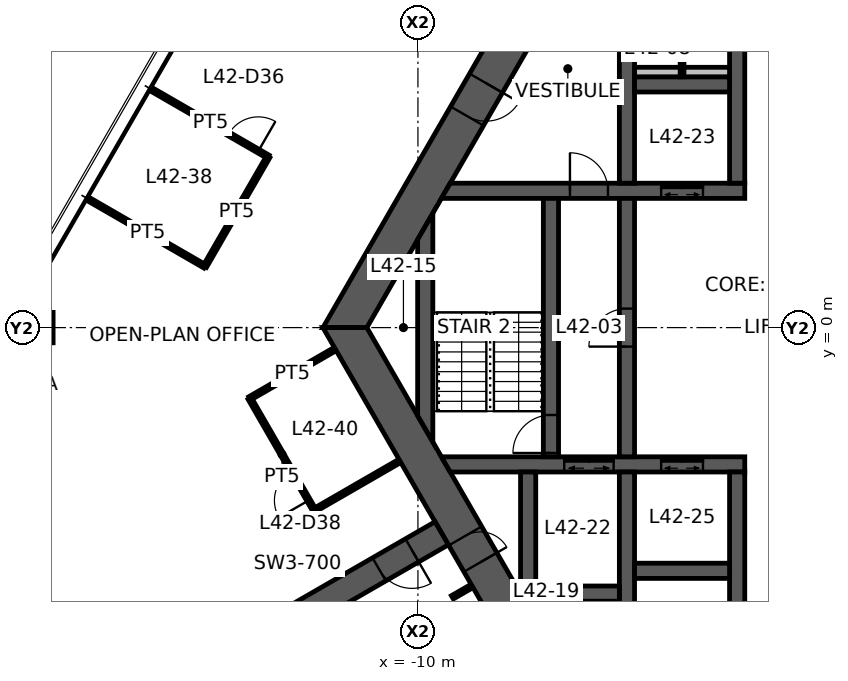
"""IFC4 building model, lengths in metres.
Left out: names, types, materials, properties, quantities, classifications, styles, units other than length and angle.
Written with IfcOpenShell. Run it as: python <this file> out.ifc"""

import sys

from ifc_helpers import new_model, si_unit, direction, frame, frame_2d, origin, origin_2d, place, context, subcontext, project, spatial, polyline, rectangle, hollow_rectangle, outline, extrude, element, fill, save


model = new_model("IFC4")
c1 = context("Model", 3, precision=1e-05, world=origin(), true_north=direction((0.0, 1.0)))
c2 = subcontext(c1, "Body", "Model", "MODEL_VIEW")
j1 = project(units=[si_unit("LENGTHUNIT", "METRE"), si_unit("PLANEANGLEUNIT", "RADIAN")], contexts=[c1])
p1 = place(None, origin())
s1 = spatial("IfcSite", under=j1, at=p1, CompositionType="ELEMENT")
p2 = place(p1, origin())
s2 = spatial("IfcBuilding", under=s1, at=p2, CompositionType="ELEMENT")
p3 = place(p2, frame((0.0, 0.0, 168.2)))
s3 = spatial("IfcBuildingStorey", under=s2, at=p3, CompositionType="ELEMENT", Elevation=168.2)
p4 = place(p3, frame((-20.0, 0.0, 0.0), z_axis=(0.0, 0.0, 1.0), x_axis=(1.0, 0.0, 0.0)))
e1 = element("IfcColumn", 1, at=p4, inside=s3, PredefinedType="COLUMN", context=c2, shape_type="SweptSolid", body=[
    extrude(hollow_rectangle(XDim=0.8, YDim=0.8, WallThickness=0.045, at=origin_2d()), origin(), (0.0, 0.0, 1.0), 3.9),
])
p5 = place(p3, frame((-5.961, 10.325, 0.0), z_axis=(0.0, 0.0, 1.0), x_axis=(-0.500004296715, -0.866022923061, 0.0)))
e2 = element("IfcWall", 2, at=p5, inside=s3, PredefinedType="SHEAR", context=c2, shape_type="SweptSolid", body=[
    extrude(outline(polyline([(-0.289, -0.5), (4.494, -0.5), (5.494, -0.5), (12.211, -0.5), (11.634, 0.5), (5.494, 0.5), (4.494, 0.5), (0.289, 0.5), (-0.289, -0.5)])), origin(), (0.0, 0.0, 1.0), 3.9),
])
p6 = place(p5, frame((4.494, 0.0, 0.0)))
e3 = element("IfcOpeningElement", 3, at=p6, cuts=e2, PredefinedType="OPENING", context=c2, shape_type="SweptSolid", body=[
    extrude(rectangle(XDim=1.0, YDim=2.1, at=frame_2d((0.5, 1.05))), frame((0.0, 0.51, 0.0), z_axis=(0.0, -1.0, 0.0), x_axis=(1.0, 0.0, 0.0)), (0.0, 0.0, 1.0), 1.02),
])
p7 = place(p3, frame((-11.922, 0.0, 0.0), z_axis=(0.0, 0.0, 1.0), x_axis=(0.500004296715, -0.866022923061, 0.0)))
e4 = element("IfcWall", 4, at=p7, inside=s3, PredefinedType="SHEAR", context=c2, shape_type="SweptSolid", body=[
    extrude(outline(polyline([(-0.289, -0.5), (6.331, -0.5), (7.131, -0.5), (12.211, -0.5), (11.634, 0.5), (7.131, 0.5), (6.331, 0.5), (0.289, 0.5), (-0.289, -0.5)])), origin(), (0.0, 0.0, 1.0), 3.9),
])
p8 = place(p7, frame((6.331, 0.0, 0.0)))
e5 = element("IfcOpeningElement", 5, at=p8, cuts=e4, PredefinedType="OPENING", context=c2, shape_type="SweptSolid", body=[
    extrude(rectangle(XDim=0.8, YDim=2.1, at=frame_2d((0.4, 1.05))), frame((0.0, 0.51, 0.0), z_axis=(0.0, -1.0, 0.0), x_axis=(1.0, 0.0, 0.0)), (0.0, 0.0, 1.0), 1.02),
])
p9 = place(p3, frame((-9.375, -5.413, 0.0), z_axis=(0.0, 0.0, 1.0), x_axis=(-0.866032377459, -0.499987921047, 0.0)))
e6 = element("IfcWall", 6, at=p9, inside=s3, PredefinedType="SHEAR", context=c2, shape_type="SweptSolid", body=[
    extrude(rectangle(XDim=7.696, YDim=0.7, at=frame_2d((3.848, 0.0))), origin(), (0.0, 0.0, 1.0), 3.9),
])
p10 = place(p9, frame((0.9, 0.0, 0.0)))
e7 = element("IfcOpeningElement", 7, at=p10, cuts=e6, PredefinedType="OPENING", context=c2, shape_type="SweptSolid", body=[
    extrude(rectangle(XDim=1.0, YDim=2.1, at=frame_2d((0.5, 1.05))), frame((0.0, 0.36, 0.0), z_axis=(0.0, -1.0, 0.0), x_axis=(1.0, 0.0, 0.0)), (0.0, 0.0, 1.0), 0.72),
])
p11 = place(p3, frame((-9.266, 3.6, 0.0), z_axis=(0.0, 0.0, 1.0), x_axis=(1.0, 0.0, 0.0)))
e8 = element("IfcWall", 8, at=p11, inside=s3, PredefinedType="SHEAR", context=c2, shape_type="SweptSolid", body=[
    extrude(outline(polyline([(-0.115, -0.2), (3.266, -0.2), (4.266, -0.2), (5.667, -0.2), (6.767, -0.2), (7.866, -0.2), (7.866, 0.2), (6.767, 0.2), (5.667, 0.2), (4.266, 0.2), (3.266, 0.2), (0.115, 0.2), (-0.115, -0.2)])), origin(), (0.0, 0.0, 1.0), 3.9),
])
p12 = place(p11, frame((3.266, 0.0, 0.0)))
e9 = element("IfcOpeningElement", 9, at=p12, cuts=e8, PredefinedType="OPENING", context=c2, shape_type="SweptSolid", body=[
    extrude(rectangle(XDim=1.0, YDim=2.1, at=frame_2d((0.5, 1.05))), frame((0.0, 0.21, 0.0), z_axis=(0.0, -1.0, 0.0), x_axis=(1.0, 0.0, 0.0)), (0.0, 0.0, 1.0), 0.42),
])
p13 = place(p11, frame((5.667, 0.0, 0.0)))
e10 = element("IfcOpeningElement", 10, at=p13, cuts=e8, PredefinedType="OPENING", context=c2, shape_type="SweptSolid", body=[
    extrude(rectangle(XDim=1.1, YDim=2.1, at=frame_2d((0.55, 1.05))), frame((0.0, 0.21, 0.0), z_axis=(0.0, -1.0, 0.0), x_axis=(1.0, 0.0, 0.0)), (0.0, 0.0, 1.0), 0.42),
])
p14 = place(p3, frame((-9.266, -3.6, 0.0), z_axis=(0.0, 0.0, 1.0), x_axis=(1.0, 0.0, 0.0)))
e11 = element("IfcWall", 11, at=p14, inside=s3, PredefinedType="SHEAR", context=c2, shape_type="SweptSolid", body=[
    extrude(outline(polyline([(0.115, -0.2), (3.116, -0.2), (4.417, -0.2), (5.667, -0.2), (6.767, -0.2), (7.866, -0.2), (7.866, 0.2), (6.767, 0.2), (5.667, 0.2), (4.417, 0.2), (3.116, 0.2), (-0.115, 0.2), (0.115, -0.2)])), origin(), (0.0, 0.0, 1.0), 3.9),
])
p15 = place(p14, frame((5.667, 0.0, 0.0)))
e12 = element("IfcOpeningElement", 12, at=p15, cuts=e11, PredefinedType="OPENING", context=c2, shape_type="SweptSolid", body=[
    extrude(rectangle(XDim=1.1, YDim=2.1, at=frame_2d((0.55, 1.05))), frame((0.0, 0.21, 0.0), z_axis=(0.0, -1.0, 0.0), x_axis=(1.0, 0.0, 0.0)), (0.0, 0.0, 1.0), 0.42),
])
p16 = place(p14, frame((3.116, 0.0, 0.0)))
e13 = element("IfcOpeningElement", 13, at=p16, cuts=e11, PredefinedType="OPENING", context=c2, shape_type="SweptSolid", body=[
    extrude(rectangle(XDim=1.3, YDim=2.1, at=frame_2d((0.65, 1.05))), frame((0.0, 0.21, 0.0), z_axis=(0.0, -1.0, 0.0), x_axis=(1.0, 0.0, 0.0)), (0.0, 0.0, 1.0), 0.42),
])
p17 = place(p3, frame((-1.6, 3.8, 0.0), z_axis=(0.0, 0.0, 1.0), x_axis=(0.0, 1.0, 0.0)))
e14 = element("IfcWall", 14, at=p17, inside=s3, PredefinedType="SHEAR", context=c2, shape_type="SweptSolid", body=[
    extrude(rectangle(XDim=6.025, YDim=0.4, at=frame_2d((3.012, 0.0))), origin(), (0.0, 0.0, 1.0), 3.9),
])
p18 = place(p17, frame((3.75, 0.0, 0.0)))
e15 = element("IfcOpeningElement", 15, at=p18, cuts=e14, PredefinedType="OPENING", context=c2, shape_type="SweptSolid", body=[
    extrude(rectangle(XDim=0.9, YDim=2.1, at=frame_2d((0.45, 1.05))), frame((0.0, 0.21, 0.0), z_axis=(0.0, -1.0, 0.0), x_axis=(1.0, 0.0, 0.0)), (0.0, 0.0, 1.0), 0.42),
])
p19 = place(p3, frame((-1.6, -3.8, 0.0), z_axis=(0.0, 0.0, 1.0), x_axis=(0.0, -1.0, 0.0)))
e16 = element("IfcWall", 16, at=p19, inside=s3, PredefinedType="SHEAR", context=c2, shape_type="SweptSolid", body=[
    extrude(rectangle(XDim=6.025, YDim=0.4, at=frame_2d((3.012, 0.0))), origin(), (0.0, 0.0, 1.0), 3.9),
])
p20 = place(p19, frame((3.75, 0.0, 0.0)))
e17 = element("IfcOpeningElement", 17, at=p20, cuts=e16, PredefinedType="OPENING", context=c2, shape_type="SweptSolid", body=[
    extrude(rectangle(XDim=0.9, YDim=2.1, at=frame_2d((0.45, 1.05))), frame((0.0, 0.21, 0.0), z_axis=(0.0, -1.0, 0.0), x_axis=(1.0, 0.0, 0.0)), (0.0, 0.0, 1.0), 0.42),
])
p21 = place(p3, frame((-4.5, -3.4, 0.0), z_axis=(0.0, 0.0, 1.0), x_axis=(0.0, 1.0, 0.0)))
e18 = element("IfcWall", 18, at=p21, inside=s3, PredefinedType="SHEAR", context=c2, shape_type="SweptSolid", body=[
    extrude(rectangle(XDim=6.8, YDim=0.4, at=frame_2d((3.4, 0.0))), origin(), (0.0, 0.0, 1.0), 3.9),
])
p22 = place(p21, frame((2.9, 0.0, 0.0)))
e19 = element("IfcOpeningElement", 19, at=p22, cuts=e18, PredefinedType="OPENING", context=c2, shape_type="SweptSolid", body=[
    extrude(rectangle(XDim=1.0, YDim=2.1, at=frame_2d((0.5, 1.05))), frame((0.0, 0.21, 0.0), z_axis=(0.0, -1.0, 0.0), x_axis=(1.0, 0.0, 0.0)), (0.0, 0.0, 1.0), 0.42),
])
p23 = place(p3, frame((-6.5, -3.4, 0.0), z_axis=(0.0, 0.0, 1.0), x_axis=(0.0, 1.0, 0.0)))
e20 = element("IfcWall", 20, at=p23, inside=s3, PredefinedType="SHEAR", context=c2, shape_type="SweptSolid", body=[
    extrude(rectangle(XDim=6.8, YDim=0.4, at=frame_2d((3.4, 0.0))), origin(), (0.0, 0.0, 1.0), 3.9),
])
p24 = place(p23, frame((0.1, 0.0, 0.0)))
e21 = element("IfcOpeningElement", 21, at=p24, cuts=e20, PredefinedType="OPENING", context=c2, shape_type="SweptSolid", body=[
    extrude(rectangle(XDim=1.0, YDim=2.1, at=frame_2d((0.5, 1.05))), frame((0.0, 0.21, 0.0), z_axis=(0.0, -1.0, 0.0), x_axis=(1.0, 0.0, 0.0)), (0.0, 0.0, 1.0), 0.42),
])
for number, where, z_axis, x_axis in (
    (22, (-4.5, 3.8, 0.0), (0.0, 0.0, 1.0), (0.0, 1.0, 0.0)),
    (23, (-4.5, -3.8, 0.0), (0.0, 0.0, 1.0), (0.0, -1.0, 0.0)),
):
    element("IfcWall", number, at=place(p3, frame(where, z_axis=z_axis, x_axis=x_axis)), inside=s3, PredefinedType="SHEAR", context=c2, shape_type="SweptSolid", body=[
        extrude(rectangle(XDim=6.025, YDim=0.4, at=frame_2d((3.012, 0.0))), origin(), (0.0, 0.0, 1.0), 3.9),
    ])
for number, where, z_axis, x_axis in (
    (24, (-4.3, 6.4, 0.0), (0.0, 0.0, 1.0), (1.0, 0.0, 0.0)),
    (25, (-4.3, -6.4, 0.0), (0.0, 0.0, 1.0), (1.0, 0.0, 0.0)),
):
    element("IfcWall", number, at=place(p3, frame(where, z_axis=z_axis, x_axis=x_axis)), inside=s3, PredefinedType="SHEAR", context=c2, shape_type="SweptSolid", body=[
        extrude(rectangle(XDim=2.5, YDim=0.4, at=frame_2d((1.25, 0.0))), origin(), (0.0, 0.0, 1.0), 3.9),
    ])
p25 = place(p3, frame((-6.9, -7.0, 0.0), z_axis=(0.0, 0.0, 1.0), x_axis=(1.0, 0.0, 0.0)))
e26 = element("IfcWall", 26, at=p25, inside=s3, PredefinedType="SHEAR", context=c2, shape_type="SweptSolid", body=[
    extrude(rectangle(XDim=2.2, YDim=0.4, at=frame_2d((1.1, 0.0))), origin(), (0.0, 0.0, 1.0), 3.9),
])
p26 = place(p3, frame((-7.1, -3.8, 0.0), z_axis=(0.0, 0.0, 1.0), x_axis=(0.0, -1.0, 0.0)))
e27 = element("IfcWall", 27, at=p26, inside=s3, PredefinedType="SHEAR", context=c2, shape_type="SweptSolid", body=[
    extrude(outline(polyline([(0.0, -0.2), (3.206, -0.2), (3.4, 0.0), (3.4, 0.2), (0.0, 0.2), (0.0, -0.2)])), origin(), (0.0, 0.0, 1.0), 3.9),
])
p27 = place(p3, frame((-9.808, -2.662, 0.0), z_axis=(0.0, 0.0, 1.0), x_axis=(0.0, 1.0, 0.0)))
e28 = element("IfcWall", 28, at=p27, inside=s3, PredefinedType="SHEAR", context=c2, shape_type="SweptSolid", body=[
    extrude(outline(polyline([(-0.346, -0.2), (5.671, -0.2), (4.978, 0.2), (0.346, 0.2), (-0.346, -0.2)])), origin(), (0.0, 0.0, 1.0), 3.9),
])
p28 = place(p3, frame((-4.3, 6.725, 0.0), z_axis=(0.0, 0.0, 1.0), x_axis=(1.0, 0.0, 0.0)))
e29 = element("IfcWall", 29, at=p28, inside=s3, PredefinedType="PLUMBINGWALL", context=c2, shape_type="SweptSolid", body=[
    extrude(rectangle(XDim=2.5, YDim=0.25, at=frame_2d((1.25, 0.0))), origin(), (0.0, 0.0, 1.0), 3.9),
])
p29 = place(p3, frame((-3.05, 6.6, 0.0), z_axis=(0.0, 0.0, 1.0), x_axis=(0.0, 1.0, 0.0)))
e30 = element("IfcWall", 30, at=p29, inside=s3, PredefinedType="PARTITIONING", context=c2, shape_type="SweptSolid", body=[
    extrude(rectangle(XDim=3.225, YDim=0.1, at=frame_2d((1.612, 0.0))), origin(), (0.0, 0.0, 1.0), 2.95),
])
p30 = place(p29, frame((1.95, 0.0, 0.0)))
e31 = element("IfcOpeningElement", 31, at=p30, cuts=e30, PredefinedType="OPENING", context=c2, shape_type="SweptSolid", body=[
    extrude(rectangle(XDim=0.9, YDim=2.1, at=frame_2d((0.45, 1.05))), frame((0.0, 0.06, 0.0), z_axis=(0.0, -1.0, 0.0), x_axis=(1.0, 0.0, 0.0)), (0.0, 0.0, 1.0), 0.12),
])
p31 = place(p29, frame((0.413, 0.0, 0.0)))
e32 = element("IfcOpeningElement", 32, at=p31, cuts=e30, PredefinedType="OPENING", context=c2, shape_type="SweptSolid", body=[
    extrude(rectangle(XDim=0.9, YDim=2.1, at=frame_2d((0.45, 1.05))), frame((0.0, 0.06, 0.0), z_axis=(0.0, -1.0, 0.0), x_axis=(1.0, 0.0, 0.0)), (0.0, 0.0, 1.0), 0.12),
])
p32 = place(p3, frame((-16.976, 6.248, 0.0), z_axis=(0.0, 0.0, 1.0), x_axis=(0.866001150353, -0.500042005822, 0.0)))
e33 = element("IfcWall", 33, at=p32, inside=s3, PredefinedType="PARTITIONING", context=c2, shape_type="SweptSolid", body=[
    extrude(rectangle(XDim=3.505, YDim=0.1, at=frame_2d((1.752, 0.0))), origin(), (0.0, 0.0, 1.0), 2.95),
])
p33 = place(p32, frame((2.305, 0.0, 0.0)))
e34 = element("IfcOpeningElement", 34, at=p33, cuts=e33, PredefinedType="OPENING", context=c2, shape_type="SweptSolid", body=[
    extrude(rectangle(XDim=0.9, YDim=2.1, at=frame_2d((0.45, 1.05))), frame((0.0, 0.06, 0.0), z_axis=(0.0, -1.0, 0.0), x_axis=(1.0, 0.0, 0.0)), (0.0, 0.0, 1.0), 0.12),
])
p34 = place(p3, frame((-15.606, 1.611, 0.0), z_axis=(0.0, 0.0, 1.0), x_axis=(-0.86601968407, 0.500009906705, 0.0)))
e35 = element("IfcWall", 35, at=p34, inside=s3, PredefinedType="PARTITIONING", context=c2, shape_type="SweptSolid", body=[
    extrude(rectangle(XDim=3.48, YDim=0.1, at=frame_2d((1.74, 0.0))), origin(), (0.0, 0.0, 1.0), 2.95),
])
p35 = place(p3, frame((-13.941, 4.495, 0.0), z_axis=(0.0, 0.0, 1.0), x_axis=(-0.500033344505, -0.86600615147, 0.0)))
e36 = element("IfcWall", 36, at=p35, inside=s3, PredefinedType="PARTITIONING", context=c2, shape_type="SweptSolid", body=[
    extrude(rectangle(XDim=3.331, YDim=0.1, at=frame_2d((1.666, 0.0))), origin(), (0.0, 0.0, 1.0), 2.95),
])
p36 = place(p3, frame((-14.427, -1.863, 0.0), z_axis=(0.0, 0.0, 1.0), x_axis=(0.866045356598, 0.49996543912, 0.0)))
e37 = element("IfcWall", 37, at=p36, inside=s3, PredefinedType="PARTITIONING", context=c2, shape_type="SweptSolid", body=[
    extrude(rectangle(XDim=2.58, YDim=0.1, at=frame_2d((1.29, 0.0))), origin(), (0.0, 0.0, 1.0), 2.95),
])
p37 = place(p3, frame((-12.726, -4.807, 0.0), z_axis=(0.0, 0.0, 1.0), x_axis=(-0.500062241894, 0.865989465428, 0.0)))
e38 = element("IfcWall", 38, at=p37, inside=s3, PredefinedType="PARTITIONING", context=c2, shape_type="SweptSolid", body=[
    extrude(rectangle(XDim=3.4, YDim=0.1, at=frame_2d((1.7, 0.0))), origin(), (0.0, 0.0, 1.0), 2.95),
])
p38 = place(p37, frame((0.3, 0.0, 0.0)))
e39 = element("IfcOpeningElement", 39, at=p38, cuts=e38, PredefinedType="OPENING", context=c2, shape_type="SweptSolid", body=[
    extrude(rectangle(XDim=0.9, YDim=2.1, at=frame_2d((0.45, 1.05))), frame((0.0, 0.06, 0.0), z_axis=(0.0, -1.0, 0.0), x_axis=(1.0, 0.0, 0.0)), (0.0, 0.0, 1.0), 0.12),
])
p39 = place(p3, frame((-10.492, -3.517, 0.0), z_axis=(0.0, 0.0, 1.0), x_axis=(-0.866021702275, -0.500006411147, 0.0)))
e40 = element("IfcWall", 40, at=p39, inside=s3, PredefinedType="PARTITIONING", context=c2, shape_type="SweptSolid", body=[
    extrude(rectangle(XDim=2.58, YDim=0.1, at=frame_2d((1.29, 0.0))), origin(), (0.0, 0.0, 1.0), 2.95),
])
p40 = place(p3, frame((-9.094, -7.098, 0.0), z_axis=(0.0, 0.0, 1.0), x_axis=(0.865954211699, 0.50012328804, 0.0)))
e41 = element("IfcWall", 41, at=p40, inside=s3, PredefinedType="PARTITIONING", context=c2, shape_type="SweptSolid", body=[
    extrude(rectangle(XDim=0.58, YDim=0.1, at=frame_2d((0.29, 0.0))), origin(), (0.0, 0.0, 1.0), 2.95),
])
p41 = place(p8, origin())
e42 = element("IfcDoor", 42, at=p41, inside=s3, OperationType="SINGLE_SWING_RIGHT", PredefinedType="DOOR", context=c2, shape_type="SweptSolid", body=[
    extrude(rectangle(XDim=0.8, YDim=2.1, at=frame_2d((0.4, 1.05))), frame((0.0, 0.025, 0.0), z_axis=(0.0, -1.0, 0.0), x_axis=(1.0, 0.0, 0.0)), (0.0, 0.0, 1.0), 0.05),
])
fill(e5, e42)
p42 = place(p6, origin())
e43 = element("IfcDoor", 43, at=p42, inside=s3, OperationType="SINGLE_SWING_LEFT", PredefinedType="DOOR", context=c2, shape_type="SweptSolid", body=[
    extrude(rectangle(XDim=1.0, YDim=2.1, at=frame_2d((0.5, 1.05))), frame((0.0, 0.025, 0.0), z_axis=(0.0, -1.0, 0.0), x_axis=(1.0, 0.0, 0.0)), (0.0, 0.0, 1.0), 0.05),
])
fill(e3, e43)
p43 = place(p22, origin())
e44 = element("IfcDoor", 44, at=p43, inside=s3, OperationType="SINGLE_SWING_LEFT", PredefinedType="DOOR", context=c2, shape_type="SweptSolid", body=[
    extrude(rectangle(XDim=1.0, YDim=2.1, at=frame_2d((0.5, 1.05))), frame((0.0, 0.025, 0.0), z_axis=(0.0, -1.0, 0.0), x_axis=(1.0, 0.0, 0.0)), (0.0, 0.0, 1.0), 0.05),
])
fill(e19, e44)
p44 = place(p24, origin())
e45 = element("IfcDoor", 45, at=p44, inside=s3, OperationType="SINGLE_SWING_LEFT", PredefinedType="DOOR", context=c2, shape_type="SweptSolid", body=[
    extrude(rectangle(XDim=1.0, YDim=2.1, at=frame_2d((0.5, 1.05))), frame((0.0, 0.025, 0.0), z_axis=(0.0, -1.0, 0.0), x_axis=(1.0, 0.0, 0.0)), (0.0, 0.0, 1.0), 0.05),
])
fill(e21, e45)
p45 = place(p12, origin())
e46 = element("IfcDoor", 46, at=p45, inside=s3, OperationType="SINGLE_SWING_LEFT", PredefinedType="DOOR", context=c2, shape_type="SweptSolid", body=[
    extrude(rectangle(XDim=1.0, YDim=2.1, at=frame_2d((0.5, 1.05))), frame((0.0, 0.025, 0.0), z_axis=(0.0, -1.0, 0.0), x_axis=(1.0, 0.0, 0.0)), (0.0, 0.0, 1.0), 0.05),
])
fill(e9, e46)
p46 = place(p10, origin())
e47 = element("IfcDoor", 47, at=p46, inside=s3, OperationType="SINGLE_SWING_LEFT", PredefinedType="DOOR", context=c2, shape_type="SweptSolid", body=[
    extrude(rectangle(XDim=1.0, YDim=2.1, at=frame_2d((0.5, 1.05))), frame((0.0, 0.025, 0.0), z_axis=(0.0, -1.0, 0.0), x_axis=(1.0, 0.0, 0.0)), (0.0, 0.0, 1.0), 0.05),
])
fill(e7, e47)
p47 = place(p31, origin())
e48 = element("IfcDoor", 48, at=p47, inside=s3, OperationType="SINGLE_SWING_RIGHT", PredefinedType="DOOR", context=c2, shape_type="SweptSolid", body=[
    extrude(rectangle(XDim=0.9, YDim=2.1, at=frame_2d((0.45, 1.05))), frame((0.0, 0.025, 0.0), z_axis=(0.0, -1.0, 0.0), x_axis=(1.0, 0.0, 0.0)), (0.0, 0.0, 1.0), 0.05),
])
fill(e32, e48)
p48 = place(p33, origin())
e49 = element("IfcDoor", 49, at=p48, inside=s3, OperationType="SINGLE_SWING_RIGHT", PredefinedType="DOOR", context=c2, shape_type="SweptSolid", body=[
    extrude(rectangle(XDim=0.9, YDim=2.1, at=frame_2d((0.45, 1.05))), frame((0.0, 0.025, 0.0), z_axis=(0.0, -1.0, 0.0), x_axis=(1.0, 0.0, 0.0)), (0.0, 0.0, 1.0), 0.05),
])
fill(e34, e49)
p49 = place(p38, origin())
e50 = element("IfcDoor", 50, at=p49, inside=s3, OperationType="SINGLE_SWING_LEFT", PredefinedType="DOOR", context=c2, shape_type="SweptSolid", body=[
    extrude(rectangle(XDim=0.9, YDim=2.1, at=frame_2d((0.45, 1.05))), frame((0.0, 0.025, 0.0), z_axis=(0.0, -1.0, 0.0), x_axis=(1.0, 0.0, 0.0)), (0.0, 0.0, 1.0), 0.05),
])
fill(e39, e50)
p50 = place(p13, origin())
e51 = element("IfcDoor", 51, at=p50, inside=s3, OperationType="DOUBLE_DOOR_SLIDING", PredefinedType="DOOR", context=c2, shape_type="SweptSolid", body=[
    extrude(rectangle(XDim=1.1, YDim=2.1, at=frame_2d((0.55, 1.05))), frame((0.0, 0.025, 0.0), z_axis=(0.0, -1.0, 0.0), x_axis=(1.0, 0.0, 0.0)), (0.0, 0.0, 1.0), 0.05),
])
fill(e10, e51)
p51 = place(p15, origin())
e52 = element("IfcDoor", 52, at=p51, inside=s3, OperationType="DOUBLE_DOOR_SLIDING", PredefinedType="DOOR", context=c2, shape_type="SweptSolid", body=[
    extrude(rectangle(XDim=1.1, YDim=2.1, at=frame_2d((0.55, 1.05))), frame((0.0, 0.025, 0.0), z_axis=(0.0, -1.0, 0.0), x_axis=(1.0, 0.0, 0.0)), (0.0, 0.0, 1.0), 0.05),
])
fill(e12, e52)
p52 = place(p16, origin())
e53 = element("IfcDoor", 53, at=p52, inside=s3, OperationType="DOUBLE_DOOR_SLIDING", PredefinedType="DOOR", context=c2, shape_type="SweptSolid", body=[
    extrude(rectangle(XDim=1.3, YDim=2.1, at=frame_2d((0.65, 1.05))), frame((0.0, 0.025, 0.0), z_axis=(0.0, -1.0, 0.0), x_axis=(1.0, 0.0, 0.0)), (0.0, 0.0, 1.0), 0.05),
])
fill(e13, e53)
save(model, sys.argv[1])
